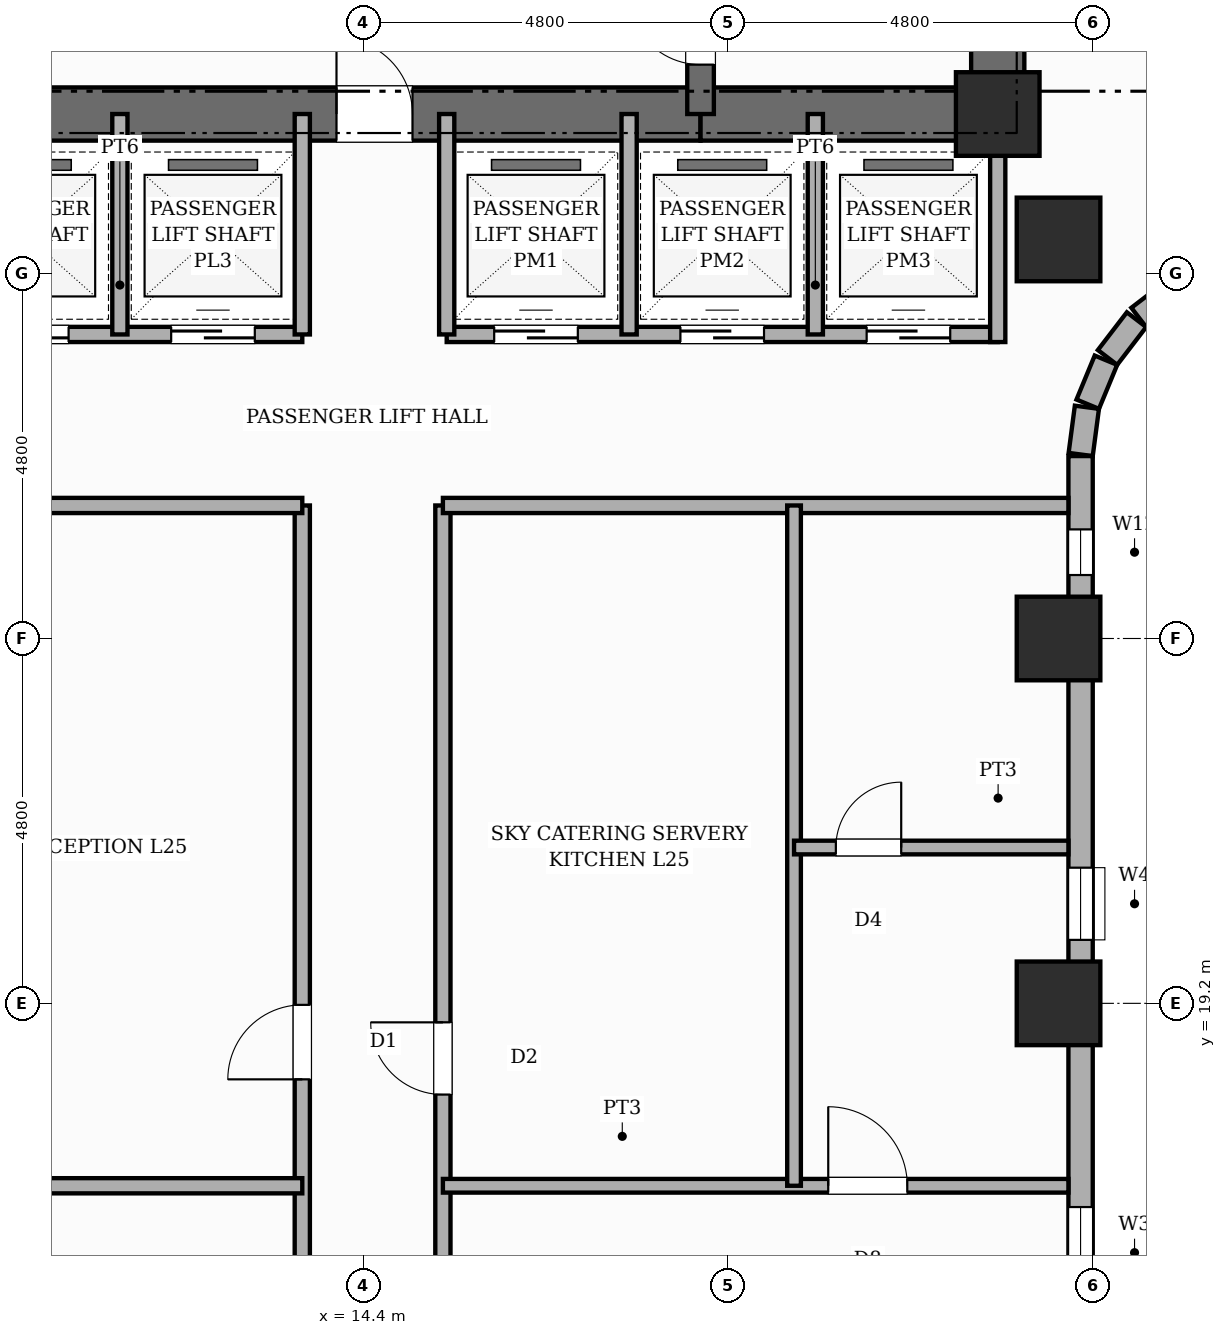
"""IFC4 building model, lengths in metres.
Left out: names, types, materials, properties, quantities, classifications, styles, units other than length and angle.
Written with IfcOpenShell. Run it as: python <this file> out.ifc"""

import sys

from ifc_helpers import new_model, si_unit, direction, frame, frame_2d, origin, origin_2d, place, context, subcontext, project, spatial, rectangle, extrude, element, fill, save


model = new_model("IFC4")
c1 = context("Model", 3, precision=1e-05, world=origin(), true_north=direction((0.0, 1.0)))
c2 = subcontext(c1, "Body", "Model", "MODEL_VIEW")
j1 = project(units=[si_unit("LENGTHUNIT", "METRE"), si_unit("PLANEANGLEUNIT", "RADIAN")], contexts=[c1])
p1 = place(None, origin())
s1 = spatial("IfcSite", under=j1, at=p1, CompositionType="ELEMENT")
p2 = place(p1, origin())
s2 = spatial("IfcBuilding", under=s1, at=p2, CompositionType="ELEMENT")
p3 = place(p2, frame((0.0, 0.0, 97.0)))
s3 = spatial("IfcBuildingStorey", under=s2, at=p3, CompositionType="ELEMENT", Elevation=97.0)
p4 = place(p3, frame((22.75, 30.55, 0.0), z_axis=(0.0, 0.0, 1.0), x_axis=(0.0, 1.0, 0.0)))
e1 = element("IfcWall", 1, at=p4, inside=s3, PredefinedType="SHEAR", context=c2, shape_type="SweptSolid", body=[
    extrude(rectangle(XDim=15.6, YDim=0.7, at=frame_2d((7.8, 0.0))), origin(), (0.0, 0.0, 1.0), 4.8),
])
p5 = place(p4, frame((10.8, 0.0, 0.0)))
e2 = element("IfcOpeningElement", 2, at=p5, cuts=e1, PredefinedType="OPENING", context=c2, shape_type="SweptSolid", body=[
    extrude(rectangle(XDim=1.0, YDim=2.15, at=frame_2d((0.5, 1.075))), frame((0.0, 0.36, 0.0), z_axis=(0.0, -1.0, 0.0), x_axis=(1.0, 0.0, 0.0)), (0.0, 0.0, 1.0), 0.72),
])
p6 = place(p3, frame((9.96, 30.9, 0.0), z_axis=(0.0, 0.0, 1.0), x_axis=(1.0, 0.0, 0.0)))
e3 = element("IfcWall", 3, at=p6, inside=s3, PredefinedType="SHEAR", context=c2, shape_type="SweptSolid", body=[
    extrude(rectangle(XDim=8.88, YDim=0.7, at=frame_2d((4.44, 0.0))), origin(), (0.0, 0.0, 1.0), 4.8),
])
p7 = place(p6, frame((4.09, 0.0, 0.0)))
e4 = element("IfcOpeningElement", 4, at=p7, cuts=e3, PredefinedType="OPENING", context=c2, shape_type="SweptSolid", body=[
    extrude(rectangle(XDim=1.0, YDim=2.15, at=frame_2d((0.5, 1.075))), frame((0.0, 0.36, 0.0), z_axis=(0.0, -1.0, 0.0), x_axis=(1.0, 0.0, 0.0)), (0.0, 0.0, 1.0), 0.72),
])
p8 = place(p3, frame((18.84, 30.9, 0.0), z_axis=(0.0, 0.0, 1.0), x_axis=(1.0, 0.0, 0.0)))
e5 = element("IfcWall", 5, at=p8, inside=s3, PredefinedType="SHEAR", context=c2, shape_type="SweptSolid", body=[
    extrude(rectangle(XDim=3.91, YDim=0.7, at=frame_2d((1.955, 0.0))), origin(), (0.0, 0.0, 1.0), 4.8),
])
p9 = place(p3, frame((18.84, 30.9, 0.0), z_axis=(0.0, 0.0, 1.0), x_axis=(0.0, 1.0, 0.0)))
e6 = element("IfcWall", 6, at=p9, inside=s3, PredefinedType="SHEAR", context=c2, shape_type="SweptSolid", body=[
    extrude(rectangle(XDim=14.9, YDim=0.35, at=frame_2d((7.45, 0.0))), origin(), (0.0, 0.0, 1.0), 4.8),
])
p10 = place(p9, frame((0.65, 0.0, 0.0)))
e7 = element("IfcOpeningElement", 7, at=p10, cuts=e6, PredefinedType="OPENING", context=c2, shape_type="SweptSolid", body=[
    extrude(rectangle(XDim=0.95, YDim=2.1, at=frame_2d((0.475, 1.05))), frame((0.0, 0.185, 0.0), z_axis=(0.0, -1.0, 0.0), x_axis=(1.0, 0.0, 0.0)), (0.0, 0.0, 1.0), 0.37),
])
p11 = place(p9, frame((10.45, 0.0, 0.0)))
e8 = element("IfcOpeningElement", 8, at=p11, cuts=e6, PredefinedType="OPENING", context=c2, shape_type="SweptSolid", body=[
    extrude(rectangle(XDim=1.0, YDim=2.15, at=frame_2d((0.5, 1.075))), frame((0.0, 0.185, 0.0), z_axis=(0.0, -1.0, 0.0), x_axis=(1.0, 0.0, 0.0)), (0.0, 0.0, 1.0), 0.37),
])
for number, where, z_axis, x_axis in (
    (9, (22.75, 30.9, 0.0), (0.0, 0.0, 1.0), (1.0, 0.0, 0.0)),
    (10, (23.55, 19.2, 0.0), (0.0, 0.0, 1.0), (1.0, 0.0, 0.0)),
    (11, (23.55, 24.0, 0.0), (0.0, 0.0, 1.0), (1.0, 0.0, 0.0)),
    (12, (23.55, 29.25, 0.0), (0.0, 0.0, 1.0), (1.0, 0.0, 0.0)),
):
    element("IfcColumn", number, at=place(p3, frame(where, z_axis=z_axis, x_axis=x_axis)), inside=s3, PredefinedType="COLUMN", context=c2, shape_type="SweptSolid", body=[
        extrude(rectangle(XDim=1.1, YDim=1.1, at=origin_2d()), origin(), (0.0, 0.0, 1.0), 4.8),
    ])
for number, where, z_axis, x_axis in (
    (13, (25.103, 28.605, 0.0), (0.0, 0.0, 1.0), (-0.793, -0.609, 0.0)),
    (14, (24.576, 28.195, 0.0), (0.0, 0.0, 1.0), (-0.609, -0.793, 0.0)),
):
    element("IfcWall", number, at=place(p3, frame(where, z_axis=z_axis, x_axis=x_axis)), inside=s3, PredefinedType="STANDARD", context=c2, shape_type="SweptSolid", body=[
        extrude(rectangle(XDim=0.626, YDim=0.32, at=frame_2d((0.313, 0.0))), origin(), (0.0, 0.0, 1.0), 4.5),
    ])
p12 = place(p3, frame((24.174, 27.661, 0.0), z_axis=(0.0, 0.0, 1.0), x_axis=(-0.382455093999, -0.923974080304, 0.0)))
e15 = element("IfcWall", 15, at=p12, inside=s3, PredefinedType="STANDARD", context=c2, shape_type="SweptSolid", body=[
    extrude(rectangle(XDim=0.626, YDim=0.32, at=frame_2d((0.313, 0.0))), origin(), (0.0, 0.0, 1.0), 4.5),
])
p13 = place(p3, frame((23.923, 27.042, 0.0), z_axis=(0.0, 0.0, 1.0), x_axis=(-0.130555323746, -0.9914410257, 0.0)))
e16 = element("IfcWall", 16, at=p13, inside=s3, PredefinedType="STANDARD", context=c2, shape_type="SweptSolid", body=[
    extrude(rectangle(XDim=0.626, YDim=0.32, at=frame_2d((0.313, 0.0))), origin(), (0.0, 0.0, 1.0), 3.68),
])
p14 = place(p3, frame((23.84, 26.4, 0.0), z_axis=(0.0, 0.0, 1.0), x_axis=(0.0, -1.0, 0.0)))
e17 = element("IfcWall", 17, at=p14, inside=s3, PredefinedType="STANDARD", context=c2, shape_type="SweptSolid", body=[
    extrude(rectangle(XDim=19.2, YDim=0.32, at=frame_2d((9.6, 0.0))), origin(), (0.0, 0.0, 1.0), 3.68),
])
p15 = place(p14, frame((9.88, 0.0, 0.8)))
e18 = element("IfcOpeningElement", 18, at=p15, cuts=e17, PredefinedType="OPENING", context=c2, shape_type="SweptSolid", body=[
    extrude(rectangle(XDim=1.2, YDim=1.8, at=frame_2d((0.6, 0.9))), frame((0.0, 0.17, 0.0), z_axis=(0.0, -1.0, 0.0), x_axis=(1.0, 0.0, 0.0)), (0.0, 0.0, 1.0), 0.34),
])
p16 = place(p14, frame((5.415, 0.0, 0.8)))
e19 = element("IfcOpeningElement", 19, at=p16, cuts=e17, PredefinedType="OPENING", context=c2, shape_type="SweptSolid", body=[
    extrude(rectangle(XDim=0.95, YDim=1.8, at=frame_2d((0.475, 0.9))), frame((0.0, 0.17, 0.0), z_axis=(0.0, -1.0, 0.0), x_axis=(1.0, 0.0, 0.0)), (0.0, 0.0, 1.0), 0.34),
])
p17 = place(p14, frame((0.965, 0.0, 0.45)))
e20 = element("IfcOpeningElement", 20, at=p17, cuts=e17, PredefinedType="OPENING", context=c2, shape_type="SweptSolid", body=[
    extrude(rectangle(XDim=0.6, YDim=1.8, at=frame_2d((0.3, 0.9))), frame((0.0, 0.17, 0.0), z_axis=(0.0, -1.0, 0.0), x_axis=(1.0, 0.0, 0.0)), (0.0, 0.0, 1.0), 0.34),
])
p18 = place(p3, frame((6.05, 28.0, 0.0), z_axis=(0.0, 0.0, 1.0), x_axis=(1.0, 0.0, 0.0)))
e21 = element("IfcWall", 21, at=p18, inside=s3, PredefinedType="POLYGONAL", context=c2, shape_type="SweptSolid", body=[
    extrude(rectangle(XDim=7.55, YDim=0.2, at=frame_2d((3.775, 0.0))), origin(), (0.0, 0.0, 1.0), 4.5),
])
p19 = place(p18, frame((0.925, 0.0, 0.0)))
e22 = element("IfcOpeningElement", 22, at=p19, cuts=e21, PredefinedType="OPENING", context=c2, shape_type="SweptSolid", body=[
    extrude(rectangle(XDim=1.1, YDim=2.15, at=frame_2d((0.55, 1.075))), frame((0.0, 0.11, 0.0), z_axis=(0.0, -1.0, 0.0), x_axis=(1.0, 0.0, 0.0)), (0.0, 0.0, 1.0), 0.22),
])
p20 = place(p18, frame((3.375, 0.0, 0.0)))
e23 = element("IfcOpeningElement", 23, at=p20, cuts=e21, PredefinedType="OPENING", context=c2, shape_type="SweptSolid", body=[
    extrude(rectangle(XDim=1.1, YDim=2.15, at=frame_2d((0.55, 1.075))), frame((0.0, 0.11, 0.0), z_axis=(0.0, -1.0, 0.0), x_axis=(1.0, 0.0, 0.0)), (0.0, 0.0, 1.0), 0.22),
])
p21 = place(p18, frame((5.825, 0.0, 0.0)))
e24 = element("IfcOpeningElement", 24, at=p21, cuts=e21, PredefinedType="OPENING", context=c2, shape_type="SweptSolid", body=[
    extrude(rectangle(XDim=1.1, YDim=2.15, at=frame_2d((0.55, 1.075))), frame((0.0, 0.11, 0.0), z_axis=(0.0, -1.0, 0.0), x_axis=(1.0, 0.0, 0.0)), (0.0, 0.0, 1.0), 0.22),
])
p22 = place(p3, frame((15.5, 28.0, 0.0), z_axis=(0.0, 0.0, 1.0), x_axis=(1.0, 0.0, 0.0)))
e25 = element("IfcWall", 25, at=p22, inside=s3, PredefinedType="POLYGONAL", context=c2, shape_type="SweptSolid", body=[
    extrude(rectangle(XDim=7.25, YDim=0.2, at=frame_2d((3.625, 0.0))), origin(), (0.0, 0.0, 1.0), 4.5),
])
p23 = place(p22, frame((0.625, 0.0, 0.0)))
e26 = element("IfcOpeningElement", 26, at=p23, cuts=e25, PredefinedType="OPENING", context=c2, shape_type="SweptSolid", body=[
    extrude(rectangle(XDim=1.1, YDim=2.15, at=frame_2d((0.55, 1.075))), frame((0.0, 0.11, 0.0), z_axis=(0.0, -1.0, 0.0), x_axis=(1.0, 0.0, 0.0)), (0.0, 0.0, 1.0), 0.22),
])
p24 = place(p22, frame((3.075, 0.0, 0.0)))
e27 = element("IfcOpeningElement", 27, at=p24, cuts=e25, PredefinedType="OPENING", context=c2, shape_type="SweptSolid", body=[
    extrude(rectangle(XDim=1.1, YDim=2.15, at=frame_2d((0.55, 1.075))), frame((0.0, 0.11, 0.0), z_axis=(0.0, -1.0, 0.0), x_axis=(1.0, 0.0, 0.0)), (0.0, 0.0, 1.0), 0.22),
])
p25 = place(p22, frame((5.525, 0.0, 0.0)))
e28 = element("IfcOpeningElement", 28, at=p25, cuts=e25, PredefinedType="OPENING", context=c2, shape_type="SweptSolid", body=[
    extrude(rectangle(XDim=1.1, YDim=2.15, at=frame_2d((0.55, 1.075))), frame((0.0, 0.11, 0.0), z_axis=(0.0, -1.0, 0.0), x_axis=(1.0, 0.0, 0.0)), (0.0, 0.0, 1.0), 0.22),
])
p26 = place(p3, frame((22.75, 27.9, 0.0), z_axis=(0.0, 0.0, 1.0), x_axis=(0.0, 1.0, 0.0)))
e29 = element("IfcWall", 29, at=p26, inside=s3, PredefinedType="POLYGONAL", context=c2, shape_type="SweptSolid", body=[
    extrude(rectangle(XDim=3.0, YDim=0.2, at=frame_2d((1.5, 0.0))), origin(), (0.0, 0.0, 1.0), 4.5),
])
for number, where, z_axis, x_axis in (
    (30, (13.6, 28.0, 0.0), (0.0, 0.0, 1.0), (0.0, 1.0, 0.0)),
    (31, (15.5, 28.0, 0.0), (0.0, 0.0, 1.0), (0.0, 1.0, 0.0)),
    (32, (11.2, 28.0, 0.0), (0.0, 0.0, 1.0), (0.0, 1.0, 0.0)),
    (33, (17.9, 28.0, 0.0), (0.0, 0.0, 1.0), (0.0, 1.0, 0.0)),
    (34, (20.35, 28.0, 0.0), (0.0, 0.0, 1.0), (0.0, 1.0, 0.0)),
):
    element("IfcWall", number, at=place(p3, frame(where, z_axis=z_axis, x_axis=x_axis)), inside=s3, PredefinedType="POLYGONAL", context=c2, shape_type="SweptSolid", body=[
        extrude(rectangle(XDim=2.9, YDim=0.2, at=frame_2d((1.45, 0.0))), origin(), (0.0, 0.0, 1.0), 4.5),
    ])
p27 = place(p3, frame((13.6, 5.12, 0.0), z_axis=(0.0, 0.0, 1.0), x_axis=(0.0, 1.0, 0.0)))
e35 = element("IfcWall", 35, at=p27, inside=s3, PredefinedType="PARTITIONING", context=c2, shape_type="SweptSolid", body=[
    extrude(rectangle(XDim=20.63, YDim=0.2, at=frame_2d((10.315, 0.0))), origin(), (0.0, 0.0, 1.0), 4.5),
])
p28 = place(p27, frame((13.08, 0.0, 0.0)))
e36 = element("IfcOpeningElement", 36, at=p28, cuts=e35, PredefinedType="OPENING", context=c2, shape_type="SweptSolid", body=[
    extrude(rectangle(XDim=0.98, YDim=2.18, at=frame_2d((0.49, 1.09))), frame((0.0, 0.11, 0.0), z_axis=(0.0, -1.0, 0.0), x_axis=(1.0, 0.0, 0.0)), (0.0, 0.0, 1.0), 0.22),
])
p29 = place(p27, frame((2.04, 0.0, 0.0)))
e37 = element("IfcOpeningElement", 37, at=p29, cuts=e35, PredefinedType="OPENING", context=c2, shape_type="SweptSolid", body=[
    extrude(rectangle(XDim=0.98, YDim=2.18, at=frame_2d((0.49, 1.09))), frame((0.0, 0.11, 0.0), z_axis=(0.0, -1.0, 0.0), x_axis=(1.0, 0.0, 0.0)), (0.0, 0.0, 1.0), 0.22),
])
p30 = place(p3, frame((15.45, 5.12, 0.0), z_axis=(0.0, 0.0, 1.0), x_axis=(0.0, 1.0, 0.0)))
e38 = element("IfcWall", 38, at=p30, inside=s3, PredefinedType="PARTITIONING", context=c2, shape_type="SweptSolid", body=[
    extrude(rectangle(XDim=20.63, YDim=0.2, at=frame_2d((10.315, 0.0))), origin(), (0.0, 0.0, 1.0), 4.5),
])
p31 = place(p30, frame((2.04, 0.0, 0.0)))
e39 = element("IfcOpeningElement", 39, at=p31, cuts=e38, PredefinedType="OPENING", context=c2, shape_type="SweptSolid", body=[
    extrude(rectangle(XDim=0.98, YDim=2.18, at=frame_2d((0.49, 1.09))), frame((0.0, 0.11, 0.0), z_axis=(0.0, -1.0, 0.0), x_axis=(1.0, 0.0, 0.0)), (0.0, 0.0, 1.0), 0.22),
])
p32 = place(p30, frame((12.88, 0.0, 0.0)))
e40 = element("IfcOpeningElement", 40, at=p32, cuts=e38, PredefinedType="OPENING", context=c2, shape_type="SweptSolid", body=[
    extrude(rectangle(XDim=0.95, YDim=2.15, at=frame_2d((0.475, 1.075))), frame((0.0, 0.11, 0.0), z_axis=(0.0, -1.0, 0.0), x_axis=(1.0, 0.0, 0.0)), (0.0, 0.0, 1.0), 0.22),
])
p33 = place(p3, frame((5.12, 25.75, 0.0), z_axis=(0.0, 0.0, 1.0), x_axis=(1.0, 0.0, 0.0)))
e41 = element("IfcWall", 41, at=p33, inside=s3, PredefinedType="PARTITIONING", context=c2, shape_type="SweptSolid", body=[
    extrude(rectangle(XDim=8.48, YDim=0.2, at=frame_2d((4.24, 0.0))), origin(), (0.0, 0.0, 1.0), 4.5),
])
p34 = place(p3, frame((15.45, 25.75, 0.0), z_axis=(0.0, 0.0, 1.0), x_axis=(1.0, 0.0, 0.0)))
e42 = element("IfcWall", 42, at=p34, inside=s3, PredefinedType="PARTITIONING", context=c2, shape_type="SweptSolid", body=[
    extrude(rectangle(XDim=8.23, YDim=0.2, at=frame_2d((4.115, 0.0))), origin(), (0.0, 0.0, 1.0), 4.5),
])
p35 = place(p3, frame((5.12, 16.8, 0.0), z_axis=(0.0, 0.0, 1.0), x_axis=(1.0, 0.0, 0.0)))
e43 = element("IfcWall", 43, at=p35, inside=s3, PredefinedType="SOLIDWALL", context=c2, shape_type="SweptSolid", body=[
    extrude(rectangle(XDim=8.48, YDim=0.2, at=frame_2d((4.24, 0.0))), origin(), (0.0, 0.0, 1.0), 4.13),
])
p36 = place(p3, frame((15.45, 16.8, 0.0), z_axis=(0.0, 0.0, 1.0), x_axis=(1.0, 0.0, 0.0)))
e44 = element("IfcWall", 44, at=p36, inside=s3, PredefinedType="PLUMBINGWALL", context=c2, shape_type="SweptSolid", body=[
    extrude(rectangle(XDim=8.23, YDim=0.18, at=frame_2d((4.115, 0.0))), origin(), (0.0, 0.0, 1.0), 4.13),
])
p37 = place(p36, frame((5.07, 0.0, 0.0)))
e45 = element("IfcOpeningElement", 45, at=p37, cuts=e44, PredefinedType="OPENING", context=c2, shape_type="SweptSolid", body=[
    extrude(rectangle(XDim=1.04, YDim=2.15, at=frame_2d((0.52, 1.075))), frame((0.0, 0.1, 0.0), z_axis=(0.0, -1.0, 0.0), x_axis=(1.0, 0.0, 0.0)), (0.0, 0.0, 1.0), 0.2),
])
p38 = place(p3, frame((20.07, 16.8, 0.0), z_axis=(0.0, 0.0, 1.0), x_axis=(0.0, 1.0, 0.0)))
e46 = element("IfcWall", 46, at=p38, inside=s3, PredefinedType="PLUMBINGWALL", context=c2, shape_type="SweptSolid", body=[
    extrude(rectangle(XDim=8.95, YDim=0.18, at=frame_2d((4.475, 0.0))), origin(), (0.0, 0.0, 1.0), 4.5),
])
p39 = place(p3, frame((20.07, 21.25, 0.0), z_axis=(0.0, 0.0, 1.0), x_axis=(1.0, 0.0, 0.0)))
e47 = element("IfcWall", 47, at=p39, inside=s3, PredefinedType="PLUMBINGWALL", context=c2, shape_type="SweptSolid", body=[
    extrude(rectangle(XDim=3.61, YDim=0.18, at=frame_2d((1.805, 0.0))), origin(), (0.0, 0.0, 1.0), 4.5),
])
p40 = place(p39, frame((0.55, 0.0, 0.0)))
e48 = element("IfcOpeningElement", 48, at=p40, cuts=e47, PredefinedType="OPENING", context=c2, shape_type="SweptSolid", body=[
    extrude(rectangle(XDim=0.86, YDim=2.1, at=frame_2d((0.43, 1.05))), frame((0.0, 0.1, 0.0), z_axis=(0.0, -1.0, 0.0), x_axis=(1.0, 0.0, 0.0)), (0.0, 0.0, 1.0), 0.2),
])
p41 = place(p15, origin())
e49 = element("IfcWindow", 49, at=p41, inside=s3, PartitioningType="SINGLE_PANEL", PredefinedType="WINDOW", context=c2, shape_type="SweptSolid", body=[
    extrude(rectangle(XDim=1.2, YDim=1.8, at=frame_2d((0.6, 0.9))), frame((0.0, 0.03, 0.0), z_axis=(0.0, -1.0, 0.0), x_axis=(1.0, 0.0, 0.0)), (0.0, 0.0, 1.0), 0.06),
])
fill(e18, e49)
p42 = place(p16, origin())
e50 = element("IfcWindow", 50, at=p42, inside=s3, PartitioningType="SINGLE_PANEL", PredefinedType="WINDOW", context=c2, shape_type="SweptSolid", body=[
    extrude(rectangle(XDim=0.95, YDim=1.8, at=frame_2d((0.475, 0.9))), frame((0.0, 0.03, 0.0), z_axis=(0.0, -1.0, 0.0), x_axis=(1.0, 0.0, 0.0)), (0.0, 0.0, 1.0), 0.06),
])
fill(e19, e50)
p43 = place(p17, origin())
e51 = element("IfcWindow", 51, at=p43, inside=s3, PartitioningType="SINGLE_PANEL", PredefinedType="WINDOW", context=c2, shape_type="SweptSolid", body=[
    extrude(rectangle(XDim=0.6, YDim=1.8, at=frame_2d((0.3, 0.9))), frame((0.0, 0.03, 0.0), z_axis=(0.0, -1.0, 0.0), x_axis=(1.0, 0.0, 0.0)), (0.0, 0.0, 1.0), 0.06),
])
fill(e20, e51)
p44 = place(p10, origin())
e52 = element("IfcDoor", 52, at=p44, inside=s3, OperationType="SINGLE_SWING_RIGHT", PredefinedType="DOOR", context=c2, shape_type="SweptSolid", body=[
    extrude(rectangle(XDim=0.95, YDim=2.1, at=frame_2d((0.475, 1.05))), frame((0.0, 0.025, 0.0), z_axis=(0.0, -1.0, 0.0), x_axis=(1.0, 0.0, 0.0)), (0.0, 0.0, 1.0), 0.05),
])
fill(e7, e52)
p45 = place(p7, origin())
e53 = element("IfcDoor", 53, at=p45, inside=s3, OperationType="SINGLE_SWING_LEFT", PredefinedType="DOOR", context=c2, shape_type="SweptSolid", body=[
    extrude(rectangle(XDim=1.0, YDim=2.15, at=frame_2d((0.5, 1.075))), frame((0.0, 0.025, 0.0), z_axis=(0.0, -1.0, 0.0), x_axis=(1.0, 0.0, 0.0)), (0.0, 0.0, 1.0), 0.05),
])
fill(e4, e53)
p46 = place(p20, origin())
e54 = element("IfcDoor", 54, at=p46, inside=s3, OperationType="SLIDING_TO_RIGHT", PredefinedType="DOOR", context=c2, shape_type="SweptSolid", body=[
    extrude(rectangle(XDim=1.1, YDim=2.15, at=frame_2d((0.55, 1.075))), frame((0.0, 0.025, 0.0), z_axis=(0.0, -1.0, 0.0), x_axis=(1.0, 0.0, 0.0)), (0.0, 0.0, 1.0), 0.05),
])
fill(e23, e54)
p47 = place(p21, origin())
e55 = element("IfcDoor", 55, at=p47, inside=s3, OperationType="SLIDING_TO_LEFT", PredefinedType="DOOR", context=c2, shape_type="SweptSolid", body=[
    extrude(rectangle(XDim=1.1, YDim=2.15, at=frame_2d((0.55, 1.075))), frame((0.0, 0.025, 0.0), z_axis=(0.0, -1.0, 0.0), x_axis=(1.0, 0.0, 0.0)), (0.0, 0.0, 1.0), 0.05),
])
fill(e24, e55)
p48 = place(p23, origin())
e56 = element("IfcDoor", 56, at=p48, inside=s3, OperationType="SLIDING_TO_RIGHT", PredefinedType="DOOR", context=c2, shape_type="SweptSolid", body=[
    extrude(rectangle(XDim=1.1, YDim=2.15, at=frame_2d((0.55, 1.075))), frame((0.0, 0.025, 0.0), z_axis=(0.0, -1.0, 0.0), x_axis=(1.0, 0.0, 0.0)), (0.0, 0.0, 1.0), 0.05),
])
fill(e26, e56)
p49 = place(p24, origin())
e57 = element("IfcDoor", 57, at=p49, inside=s3, OperationType="SLIDING_TO_LEFT", PredefinedType="DOOR", context=c2, shape_type="SweptSolid", body=[
    extrude(rectangle(XDim=1.1, YDim=2.15, at=frame_2d((0.55, 1.075))), frame((0.0, 0.025, 0.0), z_axis=(0.0, -1.0, 0.0), x_axis=(1.0, 0.0, 0.0)), (0.0, 0.0, 1.0), 0.05),
])
fill(e27, e57)
p50 = place(p25, origin())
e58 = element("IfcDoor", 58, at=p50, inside=s3, OperationType="SLIDING_TO_RIGHT", PredefinedType="DOOR", context=c2, shape_type="SweptSolid", body=[
    extrude(rectangle(XDim=1.1, YDim=2.15, at=frame_2d((0.55, 1.075))), frame((0.0, 0.025, 0.0), z_axis=(0.0, -1.0, 0.0), x_axis=(1.0, 0.0, 0.0)), (0.0, 0.0, 1.0), 0.05),
])
fill(e28, e58)
p51 = place(p28, origin())
e59 = element("IfcDoor", 59, at=p51, inside=s3, OperationType="SINGLE_SWING_LEFT", PredefinedType="DOOR", context=c2, shape_type="SweptSolid", body=[
    extrude(rectangle(XDim=0.98, YDim=2.18, at=frame_2d((0.49, 1.09))), frame((0.0, 0.025, 0.0), z_axis=(0.0, -1.0, 0.0), x_axis=(1.0, 0.0, 0.0)), (0.0, 0.0, 1.0), 0.05),
])
fill(e36, e59)
p52 = place(p32, origin())
e60 = element("IfcDoor", 60, at=p52, inside=s3, OperationType="SINGLE_SWING_RIGHT", PredefinedType="DOOR", context=c2, shape_type="SweptSolid", body=[
    extrude(rectangle(XDim=0.95, YDim=2.15, at=frame_2d((0.475, 1.075))), frame((0.0, 0.025, 0.0), z_axis=(0.0, -1.0, 0.0), x_axis=(1.0, 0.0, 0.0)), (0.0, 0.0, 1.0), 0.05),
])
fill(e40, e60)
p53 = place(p37, origin())
e61 = element("IfcDoor", 61, at=p53, inside=s3, OperationType="SINGLE_SWING_LEFT", PredefinedType="DOOR", context=c2, shape_type="SweptSolid", body=[
    extrude(rectangle(XDim=1.04, YDim=2.15, at=frame_2d((0.52, 1.075))), frame((0.0, 0.025, 0.0), z_axis=(0.0, -1.0, 0.0), x_axis=(1.0, 0.0, 0.0)), (0.0, 0.0, 1.0), 0.05),
])
fill(e45, e61)
p54 = place(p40, origin())
e62 = element("IfcDoor", 62, at=p54, inside=s3, OperationType="SINGLE_SWING_RIGHT", PredefinedType="DOOR", context=c2, shape_type="SweptSolid", body=[
    extrude(rectangle(XDim=0.86, YDim=2.1, at=frame_2d((0.43, 1.05))), frame((0.0, 0.025, 0.0), z_axis=(0.0, -1.0, 0.0), x_axis=(1.0, 0.0, 0.0)), (0.0, 0.0, 1.0), 0.05),
])
fill(e48, e62)
save(model, sys.argv[1])
